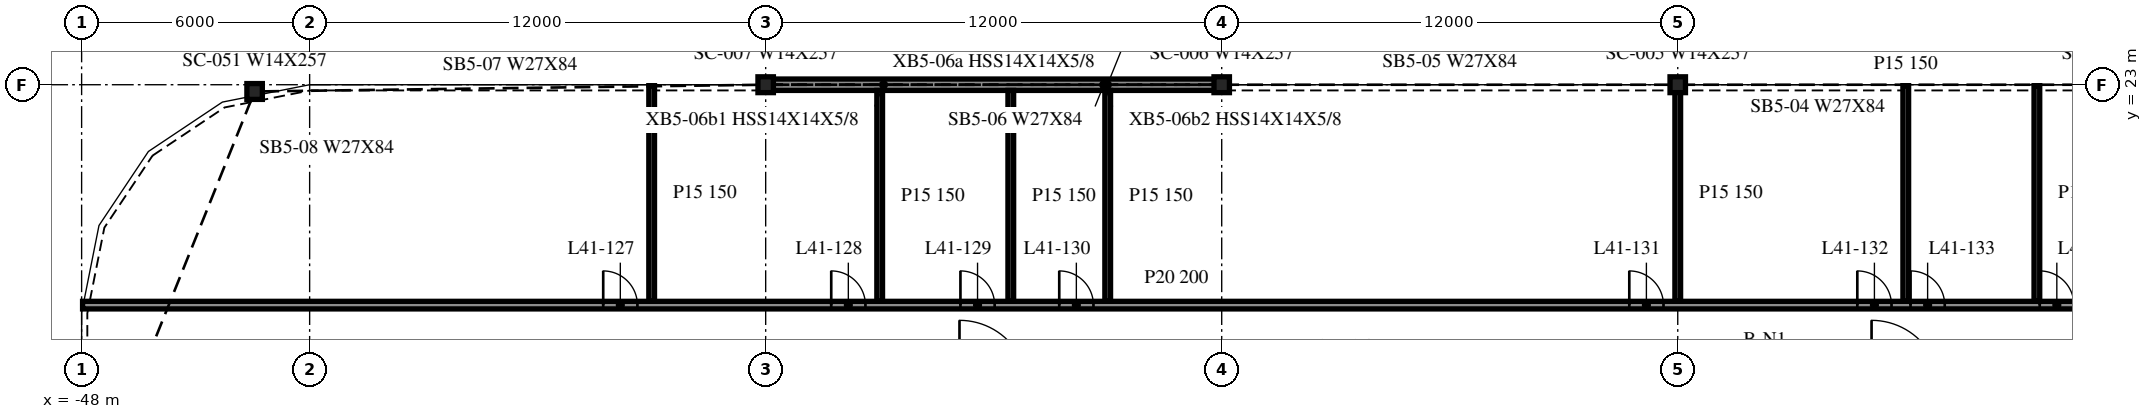
"""IFC4 building model, lengths in metres.
Left out: names, types, materials, properties, quantities, classifications, styles, units other than length and angle.
Written with IfcOpenShell. Run it as: python <this file> out.ifc"""

import sys

from ifc_helpers import new_model, si_unit, direction, frame, frame_2d, origin, origin_2d, place, context, subcontext, project, spatial, rectangle, i_section, extrude, element, fill, save


model = new_model("IFC4")
c1 = context("Model", 3, precision=1e-05, world=origin(), true_north=direction((0.0, 1.0)))
c2 = subcontext(c1, "Body", "Model", "MODEL_VIEW")
j1 = project(units=[si_unit("LENGTHUNIT", "METRE"), si_unit("PLANEANGLEUNIT", "RADIAN")], contexts=[c1])
p1 = place(None, origin())
s1 = spatial("IfcSite", under=j1, at=p1, CompositionType="ELEMENT")
p2 = place(p1, origin())
s2 = spatial("IfcBuilding", under=s1, at=p2, CompositionType="ELEMENT")
p3 = place(p2, frame((0.0, 0.0, 174.4)))
s3 = spatial("IfcBuildingStorey", under=s2, at=p3, CompositionType="ELEMENT", Elevation=174.4)
for number, where, z_axis, x_axis in (
    (1, (-6.0, 23.0, -0.34), (0.0, 0.0, 1.0), (1.0, 0.0, 0.0)),
    (2, (-18.0, 23.0, -0.34), (0.0, 0.0, 1.0), (1.0, 0.0, 0.0)),
    (3, (-30.0, 23.0, -0.34), (0.0, 0.0, 1.0), (1.0, 0.0, 0.0)),
    (4, (-43.448, 22.822, -0.34), (0.0, 0.0, 1.0), (1.0, 0.0, 0.0)),
):
    element("IfcColumn", number, at=place(p3, frame(where, z_axis=z_axis, x_axis=x_axis)), inside=s3, PredefinedType="COLUMN", context=c2, shape_type="SweptSolid", body=[
        extrude(i_section(OverallWidth=0.406, OverallDepth=0.417, WebThickness=0.03, FlangeThickness=0.048, at=origin_2d()), origin(), (0.0, 0.0, 1.0), 3.8),
    ])
p4 = place(p3, frame((-18.015, 23.0, 0.0), z_axis=(0.0, 0.0, 1.0), x_axis=(-1.0, 0.0, 0.0)))
e5 = element("IfcWall", 5, at=p4, inside=s3, PredefinedType="NOTDEFINED", context=c2, shape_type="SweptSolid", body=[
    extrude(rectangle(XDim=11.97, YDim=0.3, at=frame_2d((5.985, 0.0))), origin(), (0.0, 0.0, 1.0), 2.782),
])
p5 = place(p3, frame((-47.975, 17.2, 0.0), z_axis=(0.0, 0.0, 1.0), x_axis=(1.0, 0.0, 0.0)))
e6 = element("IfcWall", 6, at=p5, inside=s3, PredefinedType="PARTITIONING", context=c2, shape_type="SweptSolid", body=[
    extrude(rectangle(XDim=95.95, YDim=0.2, at=frame_2d((47.975, 0.0))), origin(), (0.0, 0.0, 1.0), 3.46),
])
p6 = place(p5, frame((13.7, 0.0, 0.0)))
e7 = element("IfcOpeningElement", 7, at=p6, cuts=e6, PredefinedType="OPENING", context=c2, shape_type="SweptSolid", body=[
    extrude(rectangle(XDim=0.9, YDim=2.1, at=frame_2d((0.45, 1.05))), frame((0.0, 0.11, 0.0), z_axis=(0.0, -1.0, 0.0), x_axis=(1.0, 0.0, 0.0)), (0.0, 0.0, 1.0), 0.22),
])
p7 = place(p5, frame((19.7, 0.0, 0.0)))
e8 = element("IfcOpeningElement", 8, at=p7, cuts=e6, PredefinedType="OPENING", context=c2, shape_type="SweptSolid", body=[
    extrude(rectangle(XDim=0.9, YDim=2.1, at=frame_2d((0.45, 1.05))), frame((0.0, 0.11, 0.0), z_axis=(0.0, -1.0, 0.0), x_axis=(1.0, 0.0, 0.0)), (0.0, 0.0, 1.0), 0.22),
])
p8 = place(p5, frame((23.1, 0.0, 0.0)))
e9 = element("IfcOpeningElement", 9, at=p8, cuts=e6, PredefinedType="OPENING", context=c2, shape_type="SweptSolid", body=[
    extrude(rectangle(XDim=0.9, YDim=2.1, at=frame_2d((0.45, 1.05))), frame((0.0, 0.11, 0.0), z_axis=(0.0, -1.0, 0.0), x_axis=(1.0, 0.0, 0.0)), (0.0, 0.0, 1.0), 0.22),
])
p9 = place(p5, frame((25.7, 0.0, 0.0)))
e10 = element("IfcOpeningElement", 10, at=p9, cuts=e6, PredefinedType="OPENING", context=c2, shape_type="SweptSolid", body=[
    extrude(rectangle(XDim=0.9, YDim=2.1, at=frame_2d((0.45, 1.05))), frame((0.0, 0.11, 0.0), z_axis=(0.0, -1.0, 0.0), x_axis=(1.0, 0.0, 0.0)), (0.0, 0.0, 1.0), 0.22),
])
p10 = place(p5, frame((40.7, 0.0, 0.0)))
e11 = element("IfcOpeningElement", 11, at=p10, cuts=e6, PredefinedType="OPENING", context=c2, shape_type="SweptSolid", body=[
    extrude(rectangle(XDim=0.9, YDim=2.1, at=frame_2d((0.45, 1.05))), frame((0.0, 0.11, 0.0), z_axis=(0.0, -1.0, 0.0), x_axis=(1.0, 0.0, 0.0)), (0.0, 0.0, 1.0), 0.22),
])
p11 = place(p5, frame((46.7, 0.0, 0.0)))
e12 = element("IfcOpeningElement", 12, at=p11, cuts=e6, PredefinedType="OPENING", context=c2, shape_type="SweptSolid", body=[
    extrude(rectangle(XDim=0.9, YDim=2.1, at=frame_2d((0.45, 1.05))), frame((0.0, 0.11, 0.0), z_axis=(0.0, -1.0, 0.0), x_axis=(1.0, 0.0, 0.0)), (0.0, 0.0, 1.0), 0.22),
])
p12 = place(p5, frame((48.1, 0.0, 0.0)))
e13 = element("IfcOpeningElement", 13, at=p12, cuts=e6, PredefinedType="OPENING", context=c2, shape_type="SweptSolid", body=[
    extrude(rectangle(XDim=0.9, YDim=2.1, at=frame_2d((0.45, 1.05))), frame((0.0, 0.11, 0.0), z_axis=(0.0, -1.0, 0.0), x_axis=(1.0, 0.0, 0.0)), (0.0, 0.0, 1.0), 0.22),
])
p13 = place(p5, frame((51.5, 0.0, 0.0)))
e14 = element("IfcOpeningElement", 14, at=p13, cuts=e6, PredefinedType="OPENING", context=c2, shape_type="SweptSolid", body=[
    extrude(rectangle(XDim=0.9, YDim=2.1, at=frame_2d((0.45, 1.05))), frame((0.0, 0.11, 0.0), z_axis=(0.0, -1.0, 0.0), x_axis=(1.0, 0.0, 0.0)), (0.0, 0.0, 1.0), 0.22),
])
p14 = place(p5, frame((54.5, 0.0, 0.0)))
e15 = element("IfcOpeningElement", 15, at=p14, cuts=e6, PredefinedType="OPENING", context=c2, shape_type="SweptSolid", body=[
    extrude(rectangle(XDim=0.9, YDim=2.1, at=frame_2d((0.45, 1.05))), frame((0.0, 0.11, 0.0), z_axis=(0.0, -1.0, 0.0), x_axis=(1.0, 0.0, 0.0)), (0.0, 0.0, 1.0), 0.22),
])
p15 = place(p5, frame((69.1, 0.0, 0.0)))
e16 = element("IfcOpeningElement", 16, at=p15, cuts=e6, PredefinedType="OPENING", context=c2, shape_type="SweptSolid", body=[
    extrude(rectangle(XDim=0.9, YDim=2.1, at=frame_2d((0.45, 1.05))), frame((0.0, 0.11, 0.0), z_axis=(0.0, -1.0, 0.0), x_axis=(1.0, 0.0, 0.0)), (0.0, 0.0, 1.0), 0.22),
])
p16 = place(p5, frame((75.1, 0.0, 0.0)))
e17 = element("IfcOpeningElement", 17, at=p16, cuts=e6, PredefinedType="OPENING", context=c2, shape_type="SweptSolid", body=[
    extrude(rectangle(XDim=0.9, YDim=2.1, at=frame_2d((0.45, 1.05))), frame((0.0, 0.11, 0.0), z_axis=(0.0, -1.0, 0.0), x_axis=(1.0, 0.0, 0.0)), (0.0, 0.0, 1.0), 0.22),
])
p17 = place(p5, frame((78.1, 0.0, 0.0)))
e18 = element("IfcOpeningElement", 18, at=p17, cuts=e6, PredefinedType="OPENING", context=c2, shape_type="SweptSolid", body=[
    extrude(rectangle(XDim=0.9, YDim=2.1, at=frame_2d((0.45, 1.05))), frame((0.0, 0.11, 0.0), z_axis=(0.0, -1.0, 0.0), x_axis=(1.0, 0.0, 0.0)), (0.0, 0.0, 1.0), 0.22),
])
p18 = place(p5, frame((81.1, 0.0, 0.0)))
e19 = element("IfcOpeningElement", 19, at=p18, cuts=e6, PredefinedType="OPENING", context=c2, shape_type="SweptSolid", body=[
    extrude(rectangle(XDim=0.9, YDim=2.1, at=frame_2d((0.45, 1.05))), frame((0.0, 0.11, 0.0), z_axis=(0.0, -1.0, 0.0), x_axis=(1.0, 0.0, 0.0)), (0.0, 0.0, 1.0), 0.22),
])
p19 = place(p3, frame((-33.0, 17.3, 0.0), z_axis=(0.0, 0.0, 1.0), x_axis=(0.0, 1.0, 0.0)))
e20 = element("IfcWall", 20, at=p19, inside=s3, PredefinedType="PARTITIONING", context=c2, shape_type="SweptSolid", body=[
    extrude(rectangle(XDim=5.675, YDim=0.15, at=frame_2d((2.837, 0.0))), origin(), (0.0, 0.0, 1.0), 3.46),
])
for number, where, z_axis, x_axis in (
    (21, (-27.0, 17.3, 0.0), (0.0, 0.0, 1.0), (0.0, 1.0, 0.0)),
    (22, (-23.55, 17.3, 0.0), (0.0, 0.0, 1.0), (0.0, 1.0, 0.0)),
    (23, (-21.0, 17.3, 0.0), (0.0, 0.0, 1.0), (0.0, 1.0, 0.0)),
):
    element("IfcWall", number, at=place(p3, frame(where, z_axis=z_axis, x_axis=x_axis)), inside=s3, PredefinedType="PARTITIONING", context=c2, shape_type="SweptSolid", body=[
        extrude(rectangle(XDim=5.55, YDim=0.15, at=frame_2d((2.775, 0.0))), origin(), (0.0, 0.0, 1.0), 3.46),
    ])
for number, where, z_axis, x_axis in (
    (24, (-6.0, 17.3, 0.0), (0.0, 0.0, 1.0), (0.0, 1.0, 0.0)),
    (25, (0.0, 17.3, 0.0), (0.0, 0.0, 1.0), (0.0, 1.0, 0.0)),
    (26, (3.45, 17.3, 0.0), (0.0, 0.0, 1.0), (0.0, 1.0, 0.0)),
):
    element("IfcWall", number, at=place(p3, frame(where, z_axis=z_axis, x_axis=x_axis)), inside=s3, PredefinedType="PARTITIONING", context=c2, shape_type="SweptSolid", body=[
        extrude(rectangle(XDim=5.675, YDim=0.15, at=frame_2d((2.837, 0.0))), origin(), (0.0, 0.0, 1.0), 3.46),
    ])
p20 = place(p6, origin())
e27 = element("IfcDoor", 27, at=p20, inside=s3, OperationType="SINGLE_SWING_LEFT", PredefinedType="DOOR", context=c2, shape_type="SweptSolid", body=[
    extrude(rectangle(XDim=0.9, YDim=2.1, at=frame_2d((0.45, 1.05))), frame((0.0, 0.025, 0.0), z_axis=(0.0, -1.0, 0.0), x_axis=(1.0, 0.0, 0.0)), (0.0, 0.0, 1.0), 0.05),
])
fill(e7, e27)
p21 = place(p7, origin())
e28 = element("IfcDoor", 28, at=p21, inside=s3, OperationType="SINGLE_SWING_LEFT", PredefinedType="DOOR", context=c2, shape_type="SweptSolid", body=[
    extrude(rectangle(XDim=0.9, YDim=2.1, at=frame_2d((0.45, 1.05))), frame((0.0, 0.025, 0.0), z_axis=(0.0, -1.0, 0.0), x_axis=(1.0, 0.0, 0.0)), (0.0, 0.0, 1.0), 0.05),
])
fill(e8, e28)
p22 = place(p8, origin())
e29 = element("IfcDoor", 29, at=p22, inside=s3, OperationType="SINGLE_SWING_LEFT", PredefinedType="DOOR", context=c2, shape_type="SweptSolid", body=[
    extrude(rectangle(XDim=0.9, YDim=2.1, at=frame_2d((0.45, 1.05))), frame((0.0, 0.025, 0.0), z_axis=(0.0, -1.0, 0.0), x_axis=(1.0, 0.0, 0.0)), (0.0, 0.0, 1.0), 0.05),
])
fill(e9, e29)
p23 = place(p9, origin())
e30 = element("IfcDoor", 30, at=p23, inside=s3, OperationType="SINGLE_SWING_LEFT", PredefinedType="DOOR", context=c2, shape_type="SweptSolid", body=[
    extrude(rectangle(XDim=0.9, YDim=2.1, at=frame_2d((0.45, 1.05))), frame((0.0, 0.025, 0.0), z_axis=(0.0, -1.0, 0.0), x_axis=(1.0, 0.0, 0.0)), (0.0, 0.0, 1.0), 0.05),
])
fill(e10, e30)
p24 = place(p10, origin())
e31 = element("IfcDoor", 31, at=p24, inside=s3, OperationType="SINGLE_SWING_LEFT", PredefinedType="DOOR", context=c2, shape_type="SweptSolid", body=[
    extrude(rectangle(XDim=0.9, YDim=2.1, at=frame_2d((0.45, 1.05))), frame((0.0, 0.025, 0.0), z_axis=(0.0, -1.0, 0.0), x_axis=(1.0, 0.0, 0.0)), (0.0, 0.0, 1.0), 0.05),
])
fill(e11, e31)
p25 = place(p11, origin())
e32 = element("IfcDoor", 32, at=p25, inside=s3, OperationType="SINGLE_SWING_LEFT", PredefinedType="DOOR", context=c2, shape_type="SweptSolid", body=[
    extrude(rectangle(XDim=0.9, YDim=2.1, at=frame_2d((0.45, 1.05))), frame((0.0, 0.025, 0.0), z_axis=(0.0, -1.0, 0.0), x_axis=(1.0, 0.0, 0.0)), (0.0, 0.0, 1.0), 0.05),
])
fill(e12, e32)
p26 = place(p12, origin())
e33 = element("IfcDoor", 33, at=p26, inside=s3, OperationType="SINGLE_SWING_RIGHT", PredefinedType="DOOR", context=c2, shape_type="SweptSolid", body=[
    extrude(rectangle(XDim=0.9, YDim=2.1, at=frame_2d((0.45, 1.05))), frame((0.0, 0.025, 0.0), z_axis=(0.0, -1.0, 0.0), x_axis=(1.0, 0.0, 0.0)), (0.0, 0.0, 1.0), 0.05),
])
fill(e13, e33)
p27 = place(p13, origin())
e34 = element("IfcDoor", 34, at=p27, inside=s3, OperationType="SINGLE_SWING_RIGHT", PredefinedType="DOOR", context=c2, shape_type="SweptSolid", body=[
    extrude(rectangle(XDim=0.9, YDim=2.1, at=frame_2d((0.45, 1.05))), frame((0.0, 0.025, 0.0), z_axis=(0.0, -1.0, 0.0), x_axis=(1.0, 0.0, 0.0)), (0.0, 0.0, 1.0), 0.05),
])
fill(e14, e34)
save(model, sys.argv[1])
